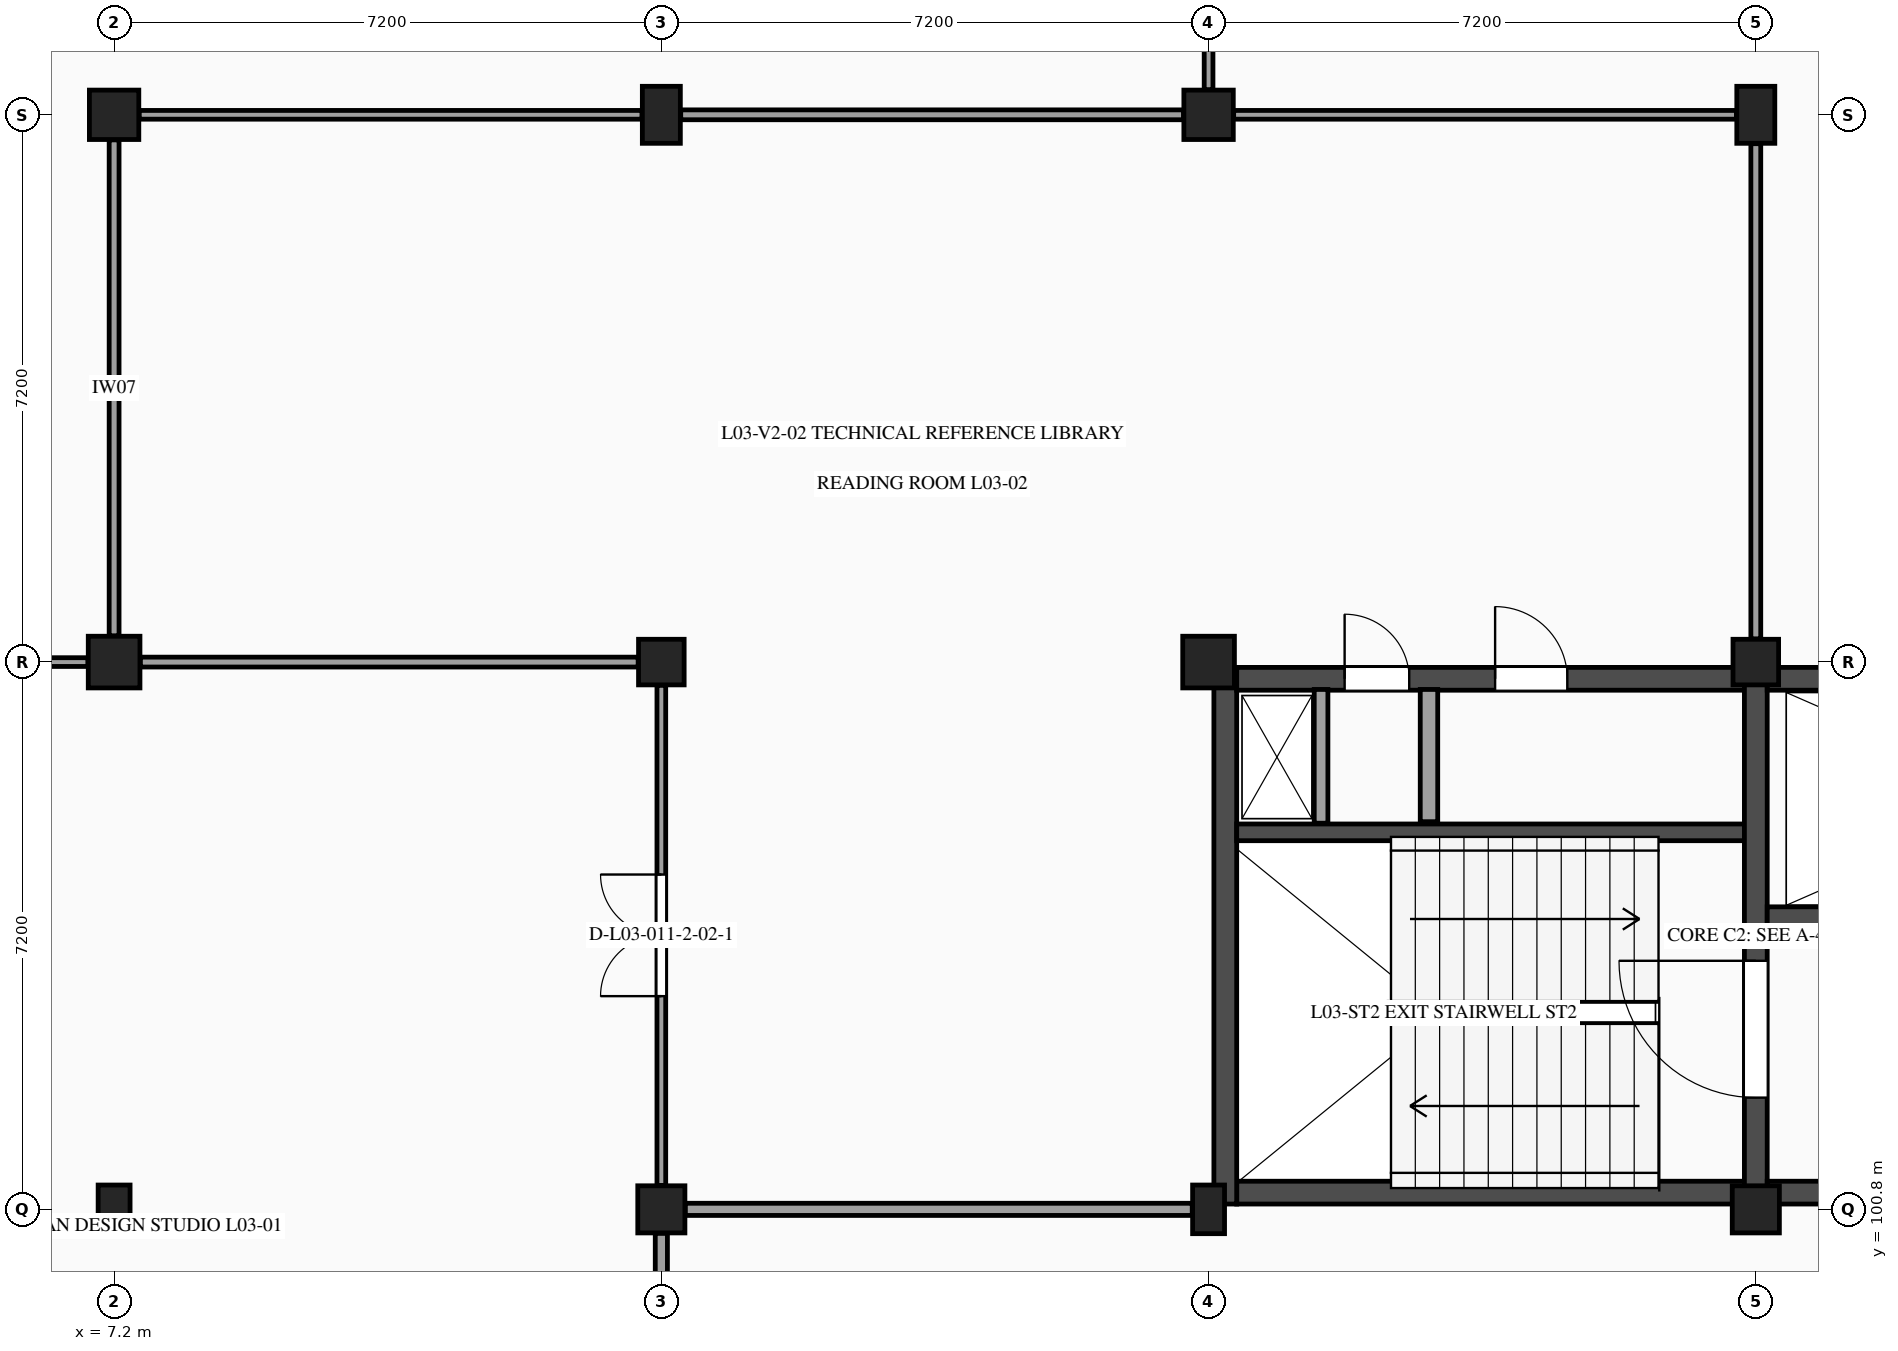
"""IFC4 building model, lengths in metres.
Left out: names, types, materials, properties, quantities, classifications, styles, units other than length and angle.
Written with IfcOpenShell. Run it as: python <this file> out.ifc"""

import sys

from ifc_helpers import new_model, si_unit, direction, frame, frame_2d, origin, origin_2d, place, context, subcontext, project, spatial, rectangle, extrude, element, fill, save


model = new_model("IFC4")
c1 = context("Model", 3, precision=1e-05, world=origin(), true_north=direction((0.0, 1.0)))
c2 = subcontext(c1, "Body", "Model", "MODEL_VIEW")
j1 = project(units=[si_unit("LENGTHUNIT", "METRE"), si_unit("PLANEANGLEUNIT", "RADIAN")], contexts=[c1])
p1 = place(None, origin())
s1 = spatial("IfcSite", under=j1, at=p1, CompositionType="ELEMENT")
p2 = place(p1, origin())
s2 = spatial("IfcBuilding", under=s1, at=p2, CompositionType="ELEMENT")
p3 = place(p2, frame((0.0, 0.0, 14.4)))
s3 = spatial("IfcBuildingStorey", under=s2, at=p3, CompositionType="ELEMENT", Elevation=14.4)
p4 = place(p3, frame((7.2, 100.8, 0.0), z_axis=(0.0, 0.0, 1.0), x_axis=(1.0, 0.0, 0.0)))
e1 = element("IfcColumn", 1, at=p4, inside=s3, PredefinedType="PILASTER", context=c2, shape_type="SweptSolid", body=[
    extrude(rectangle(XDim=0.42, YDim=0.64, at=origin_2d()), origin(), (0.0, 0.0, 1.0), 4.2),
])
p5 = place(p3, frame((7.2, 108.0, 0.0), z_axis=(0.0, 0.0, 1.0), x_axis=(1.0, 0.0, 0.0)))
e2 = element("IfcColumn", 2, at=p5, inside=s3, PredefinedType="COLUMN", context=c2, shape_type="SweptSolid", body=[
    extrude(rectangle(XDim=0.68, YDim=0.68, at=origin_2d()), origin(), (0.0, 0.0, 1.0), 4.2),
])
p6 = place(p3, frame((7.2, 115.2, 0.0), z_axis=(0.0, 0.0, 1.0), x_axis=(1.0, 0.0, 0.0)))
e3 = element("IfcColumn", 3, at=p6, inside=s3, PredefinedType="COLUMN", context=c2, shape_type="SweptSolid", body=[
    extrude(rectangle(XDim=0.65, YDim=0.65, at=origin_2d()), origin(), (0.0, 0.0, 1.0), 4.2),
])
p7 = place(p3, frame((14.4, 100.8, 0.0), z_axis=(0.0, 0.0, 1.0), x_axis=(1.0, 0.0, 0.0)))
e4 = element("IfcColumn", 4, at=p7, inside=s3, PredefinedType="COLUMN", context=c2, shape_type="SweptSolid", body=[
    extrude(rectangle(XDim=0.62, YDim=0.62, at=origin_2d()), origin(), (0.0, 0.0, 1.0), 4.2),
])
p8 = place(p3, frame((14.4, 108.0, 0.0), z_axis=(0.0, 0.0, 1.0), x_axis=(1.0, 0.0, 0.0)))
e5 = element("IfcColumn", 5, at=p8, inside=s3, PredefinedType="COLUMN", context=c2, shape_type="SweptSolid", body=[
    extrude(rectangle(XDim=0.6, YDim=0.6, at=origin_2d()), origin(), (0.0, 0.0, 1.0), 4.2),
])
p9 = place(p3, frame((14.4, 115.2, 0.0), z_axis=(0.0, 0.0, 1.0), x_axis=(1.0, 0.0, 0.0)))
e6 = element("IfcColumn", 6, at=p9, inside=s3, PredefinedType="COLUMN", context=c2, shape_type="SweptSolid", body=[
    extrude(rectangle(XDim=0.5, YDim=0.75, at=origin_2d()), origin(), (0.0, 0.0, 1.0), 4.2),
])
p10 = place(p3, frame((21.6, 100.8, 0.0), z_axis=(0.0, 0.0, 1.0), x_axis=(1.0, 0.0, 0.0)))
e7 = element("IfcColumn", 7, at=p10, inside=s3, PredefinedType="PILASTER", context=c2, shape_type="SweptSolid", body=[
    extrude(rectangle(XDim=0.42, YDim=0.64, at=origin_2d()), origin(), (0.0, 0.0, 1.0), 4.2),
])
p11 = place(p3, frame((21.6, 108.0, 0.0), z_axis=(0.0, 0.0, 1.0), x_axis=(1.0, 0.0, 0.0)))
e8 = element("IfcColumn", 8, at=p11, inside=s3, PredefinedType="COLUMN", context=c2, shape_type="SweptSolid", body=[
    extrude(rectangle(XDim=0.68, YDim=0.68, at=origin_2d()), origin(), (0.0, 0.0, 1.0), 4.2),
])
p12 = place(p3, frame((21.6, 115.2, 0.0), z_axis=(0.0, 0.0, 1.0), x_axis=(1.0, 0.0, 0.0)))
e9 = element("IfcColumn", 9, at=p12, inside=s3, PredefinedType="COLUMN", context=c2, shape_type="SweptSolid", body=[
    extrude(rectangle(XDim=0.65, YDim=0.65, at=origin_2d()), origin(), (0.0, 0.0, 1.0), 4.2),
])
p13 = place(p3, frame((28.8, 100.8, 0.0), z_axis=(0.0, 0.0, 1.0), x_axis=(1.0, 0.0, 0.0)))
e10 = element("IfcColumn", 10, at=p13, inside=s3, PredefinedType="COLUMN", context=c2, shape_type="SweptSolid", body=[
    extrude(rectangle(XDim=0.62, YDim=0.62, at=origin_2d()), origin(), (0.0, 0.0, 1.0), 4.2),
])
p14 = place(p3, frame((28.8, 108.0, 0.0), z_axis=(0.0, 0.0, 1.0), x_axis=(1.0, 0.0, 0.0)))
e11 = element("IfcColumn", 11, at=p14, inside=s3, PredefinedType="COLUMN", context=c2, shape_type="SweptSolid", body=[
    extrude(rectangle(XDim=0.6, YDim=0.6, at=origin_2d()), origin(), (0.0, 0.0, 1.0), 4.2),
])
p15 = place(p3, frame((28.8, 115.2, 0.0), z_axis=(0.0, 0.0, 1.0), x_axis=(1.0, 0.0, 0.0)))
e12 = element("IfcColumn", 12, at=p15, inside=s3, PredefinedType="COLUMN", context=c2, shape_type="SweptSolid", body=[
    extrude(rectangle(XDim=0.5, YDim=0.75, at=origin_2d()), origin(), (0.0, 0.0, 1.0), 4.2),
])
p16 = place(p3, frame((21.97, 101.02, 0.0), z_axis=(0.0, 0.0, 1.0), x_axis=(1.0, 0.0, 0.0)))
e13 = element("IfcWall", 13, at=p16, inside=s3, PredefinedType="SHEAR", context=c2, shape_type="SweptSolid", body=[
    extrude(rectangle(XDim=6.68, YDim=0.3, at=frame_2d((3.34, 0.0))), origin(), (0.0, 0.0, 1.0), 3.94),
])
p17 = place(p3, frame((21.82, 107.93, 0.0), z_axis=(0.0, 0.0, 1.0), x_axis=(0.0, -1.0, 0.0)))
e14 = element("IfcWall", 14, at=p17, inside=s3, PredefinedType="SHEAR", context=c2, shape_type="SweptSolid", body=[
    extrude(rectangle(XDim=7.06, YDim=0.3, at=frame_2d((3.53, 0.0))), origin(), (0.0, 0.0, 1.0), 3.94),
])
p18 = place(p3, frame((21.97, 107.78, 0.0), z_axis=(0.0, 0.0, 1.0), x_axis=(1.0, 0.0, 0.0)))
e15 = element("IfcWall", 15, at=p18, inside=s3, PredefinedType="SHEAR", context=c2, shape_type="SweptSolid", body=[
    extrude(rectangle(XDim=6.68, YDim=0.3, at=frame_2d((3.34, 0.0))), origin(), (0.0, 0.0, 1.0), 3.94),
])
p19 = place(p18, frame((1.42, 0.0, 0.0)))
e16 = element("IfcOpeningElement", 16, at=p19, cuts=e15, PredefinedType="OPENING", context=c2, shape_type="SweptSolid", body=[
    extrude(rectangle(XDim=0.85, YDim=2.1, at=frame_2d((0.425, 1.05))), frame((0.0, 0.16, 0.0), z_axis=(0.0, -1.0, 0.0), x_axis=(1.0, 0.0, 0.0)), (0.0, 0.0, 1.0), 0.32),
])
p20 = place(p18, frame((3.4, 0.0, 0.0)))
e17 = element("IfcOpeningElement", 17, at=p20, cuts=e15, PredefinedType="OPENING", context=c2, shape_type="SweptSolid", body=[
    extrude(rectangle(XDim=0.95, YDim=2.15, at=frame_2d((0.475, 1.075))), frame((0.0, 0.16, 0.0), z_axis=(0.0, -1.0, 0.0), x_axis=(1.0, 0.0, 0.0)), (0.0, 0.0, 1.0), 0.32),
])
p21 = place(p3, frame((21.97, 105.76, 0.0), z_axis=(0.0, 0.0, 1.0), x_axis=(1.0, 0.0, 0.0)))
e18 = element("IfcWall", 18, at=p21, inside=s3, PredefinedType="SHEAR", context=c2, shape_type="SweptSolid", body=[
    extrude(rectangle(XDim=6.68, YDim=0.22, at=frame_2d((3.34, 0.0))), origin(), (0.0, 0.0, 1.0), 3.94),
])
p22 = place(p3, frame((24.5, 105.9, 0.0), z_axis=(0.0, 0.0, 1.0), x_axis=(0.0, 1.0, 0.0)))
e19 = element("IfcWall", 19, at=p22, inside=s3, PredefinedType="PARTITIONING", context=c2, shape_type="SweptSolid", body=[
    extrude(rectangle(XDim=1.74, YDim=0.23, at=frame_2d((0.87, 0.0))), origin(), (0.0, 0.0, 1.0), 3.94),
])
p23 = place(p3, frame((23.08, 105.88, 0.0), z_axis=(0.0, 0.0, 1.0), x_axis=(0.0, 1.0, 0.0)))
e20 = element("IfcWall", 20, at=p23, inside=s3, PredefinedType="PARTITIONING", context=c2, shape_type="SweptSolid", body=[
    extrude(rectangle(XDim=1.76, YDim=0.18, at=frame_2d((0.88, 0.0))), origin(), (0.0, 0.0, 1.0), 3.94),
])
p24 = place(p3, frame((28.8, 100.87, 0.0), z_axis=(0.0, 0.0, 1.0), x_axis=(0.0, 1.0, 0.0)))
e21 = element("IfcWall", 21, at=p24, inside=s3, PredefinedType="SHEAR", context=c2, shape_type="SweptSolid", body=[
    extrude(rectangle(XDim=7.06, YDim=0.3, at=frame_2d((3.53, 0.0))), origin(), (0.0, 0.0, 1.0), 3.94),
])
p25 = place(p24, frame((1.4, 0.0, 0.0)))
e22 = element("IfcOpeningElement", 22, at=p25, cuts=e21, PredefinedType="OPENING", context=c2, shape_type="SweptSolid", body=[
    extrude(rectangle(XDim=1.8, YDim=2.2, at=frame_2d((0.9, 1.1))), frame((0.0, 0.16, 0.0), z_axis=(0.0, -1.0, 0.0), x_axis=(1.0, 0.0, 0.0)), (0.0, 0.0, 1.0), 0.32),
])
p26 = place(p3, frame((28.95, 101.02, 0.0), z_axis=(0.0, 0.0, 1.0), x_axis=(1.0, 0.0, 0.0)))
e23 = element("IfcWall", 23, at=p26, inside=s3, PredefinedType="SHEAR", context=c2, shape_type="SweptSolid", body=[
    extrude(rectangle(XDim=6.68, YDim=0.3, at=frame_2d((3.34, 0.0))), origin(), (0.0, 0.0, 1.0), 3.94),
])
p27 = place(p26, frame((2.22, 0.0, 0.0)))
e24 = element("IfcOpeningElement", 24, at=p27, cuts=e23, PredefinedType="OPENING", context=c2, shape_type="SweptSolid", body=[
    extrude(rectangle(XDim=1.8, YDim=2.2, at=frame_2d((0.9, 1.1))), frame((0.0, 0.16, 0.0), z_axis=(0.0, -1.0, 0.0), x_axis=(1.0, 0.0, 0.0)), (0.0, 0.0, 1.0), 0.32),
])
p28 = place(p3, frame((28.95, 107.78, 0.0), z_axis=(0.0, 0.0, 1.0), x_axis=(1.0, 0.0, 0.0)))
e25 = element("IfcWall", 25, at=p28, inside=s3, PredefinedType="SHEAR", context=c2, shape_type="SweptSolid", body=[
    extrude(rectangle(XDim=6.68, YDim=0.3, at=frame_2d((3.34, 0.0))), origin(), (0.0, 0.0, 1.0), 3.94),
])
p29 = place(p3, frame((28.95, 104.65, 0.0), z_axis=(0.0, 0.0, 1.0), x_axis=(1.0, 0.0, 0.0)))
e26 = element("IfcWall", 26, at=p29, inside=s3, PredefinedType="SHEAR", context=c2, shape_type="SweptSolid", body=[
    extrude(rectangle(XDim=6.68, YDim=0.26, at=frame_2d((3.34, 0.0))), origin(), (0.0, 0.0, 1.0), 3.94),
])
p30 = place(p29, frame((0.95, 0.0, 0.0)))
e27 = element("IfcOpeningElement", 27, at=p30, cuts=e26, PredefinedType="OPENING", context=c2, shape_type="SweptSolid", body=[
    extrude(rectangle(XDim=1.1, YDim=2.2, at=frame_2d((0.55, 1.1))), frame((0.0, 0.14, 0.0), z_axis=(0.0, -1.0, 0.0), x_axis=(1.0, 0.0, 0.0)), (0.0, 0.0, 1.0), 0.28),
])
p31 = place(p29, frame((4.1, 0.0, 0.0)))
e28 = element("IfcOpeningElement", 28, at=p31, cuts=e26, PredefinedType="OPENING", context=c2, shape_type="SweptSolid", body=[
    extrude(rectangle(XDim=1.0, YDim=2.15, at=frame_2d((0.5, 1.075))), frame((0.0, 0.14, 0.0), z_axis=(0.0, -1.0, 0.0), x_axis=(1.0, 0.0, 0.0)), (0.0, 0.0, 1.0), 0.28),
])
p32 = place(p3, frame((0.305, 108.0, 0.0), z_axis=(0.0, 0.0, 1.0), x_axis=(1.0, 0.0, 0.0)))
e29 = element("IfcWall", 29, at=p32, inside=s3, PredefinedType="PARTITIONING", context=c2, shape_type="SweptSolid", body=[
    extrude(rectangle(XDim=6.55, YDim=0.115, at=frame_2d((3.275, 0.0))), origin(), (0.0, 0.0, 1.0), 3.215),
])
p33 = place(p32, frame((2.315, 0.0, 0.0)))
e30 = element("IfcOpeningElement", 30, at=p33, cuts=e29, PredefinedType="OPENING", context=c2, shape_type="SweptSolid", body=[
    extrude(rectangle(XDim=1.92, YDim=2.35, at=frame_2d((0.96, 1.175))), frame((0.0, 0.067, 0.0), z_axis=(0.0, -1.0, 0.0), x_axis=(1.0, 0.0, 0.0)), (0.0, 0.0, 1.0), 0.135),
])
p34 = place(p3, frame((7.2, 108.345, 0.0), z_axis=(0.0, 0.0, 1.0), x_axis=(0.0, 1.0, 0.0)))
e31 = element("IfcWall", 31, at=p34, inside=s3, PredefinedType="PARTITIONING", context=c2, shape_type="SweptSolid", body=[
    extrude(rectangle(XDim=6.525, YDim=0.13, at=frame_2d((3.263, 0.0))), origin(), (0.0, 0.0, 1.0), 3.245),
])
p35 = place(p3, frame((14.4, 93.93, 0.0), z_axis=(0.0, 0.0, 1.0), x_axis=(0.0, 1.0, 0.0)))
e32 = element("IfcWall", 32, at=p35, inside=s3, PredefinedType="PARTITIONING", context=c2, shape_type="SweptSolid", body=[
    extrude(rectangle(XDim=6.555, YDim=0.16, at=frame_2d((3.278, 0.0))), origin(), (0.0, 0.0, 1.0), 3.255),
])
p36 = place(p35, frame((2.587, 0.0, 0.0)))
e33 = element("IfcOpeningElement", 33, at=p36, cuts=e32, PredefinedType="OPENING", context=c2, shape_type="SweptSolid", body=[
    extrude(rectangle(XDim=1.38, YDim=2.22, at=frame_2d((0.69, 1.11))), frame((0.0, 0.09, 0.0), z_axis=(0.0, -1.0, 0.0), x_axis=(1.0, 0.0, 0.0)), (0.0, 0.0, 1.0), 0.18),
])
p37 = place(p3, frame((14.4, 101.115, 0.0), z_axis=(0.0, 0.0, 1.0), x_axis=(0.0, 1.0, 0.0)))
e34 = element("IfcWall", 34, at=p37, inside=s3, PredefinedType="PARTITIONING", context=c2, shape_type="SweptSolid", body=[
    extrude(rectangle(XDim=6.58, YDim=0.115, at=frame_2d((3.29, 0.0))), origin(), (0.0, 0.0, 1.0), 3.25),
])
p38 = place(p37, frame((2.49, 0.0, 0.0)))
e35 = element("IfcOpeningElement", 35, at=p38, cuts=e34, PredefinedType="OPENING", context=c2, shape_type="SweptSolid", body=[
    extrude(rectangle(XDim=1.6, YDim=2.2, at=frame_2d((0.8, 1.1))), frame((0.0, 0.067, 0.0), z_axis=(0.0, -1.0, 0.0), x_axis=(1.0, 0.0, 0.0)), (0.0, 0.0, 1.0), 0.135),
])
p39 = place(p3, frame((7.545, 108.0, 0.0), z_axis=(0.0, 0.0, 1.0), x_axis=(1.0, 0.0, 0.0)))
e36 = element("IfcWall", 36, at=p39, inside=s3, PredefinedType="PARTITIONING", context=c2, shape_type="SweptSolid", body=[
    extrude(rectangle(XDim=6.55, YDim=0.13, at=frame_2d((3.275, 0.0))), origin(), (0.0, 0.0, 1.0), 3.22),
])
p40 = place(p3, frame((7.53, 115.2, 0.0), z_axis=(0.0, 0.0, 1.0), x_axis=(1.0, 0.0, 0.0)))
e37 = element("IfcWall", 37, at=p40, inside=s3, PredefinedType="PARTITIONING", context=c2, shape_type="SweptSolid", body=[
    extrude(rectangle(XDim=6.615, YDim=0.115, at=frame_2d((3.308, 0.0))), origin(), (0.0, 0.0, 1.0), 3.22),
])
p41 = place(p3, frame((14.715, 100.8, 0.0), z_axis=(0.0, 0.0, 1.0), x_axis=(1.0, 0.0, 0.0)))
e38 = element("IfcWall", 38, at=p41, inside=s3, PredefinedType="PARTITIONING", context=c2, shape_type="SweptSolid", body=[
    extrude(rectangle(XDim=6.67, YDim=0.16, at=frame_2d((3.335, 0.0))), origin(), (0.0, 0.0, 1.0), 3.24),
])
p42 = place(p3, frame((14.655, 115.2, 0.0), z_axis=(0.0, 0.0, 1.0), x_axis=(1.0, 0.0, 0.0)))
e39 = element("IfcWall", 39, at=p42, inside=s3, PredefinedType="PARTITIONING", context=c2, shape_type="SweptSolid", body=[
    extrude(rectangle(XDim=6.615, YDim=0.13, at=frame_2d((3.308, 0.0))), origin(), (0.0, 0.0, 1.0), 3.24),
])
p43 = place(p3, frame((21.6, 115.53, 0.0), z_axis=(0.0, 0.0, 1.0), x_axis=(0.0, 1.0, 0.0)))
e40 = element("IfcWall", 40, at=p43, inside=s3, PredefinedType="PARTITIONING", context=c2, shape_type="SweptSolid", body=[
    extrude(rectangle(XDim=6.555, YDim=0.115, at=frame_2d((3.277, 0.0))), origin(), (0.0, 0.0, 1.0), 3.245),
])
p44 = place(p43, frame((2.397, 0.0, 0.0)))
e41 = element("IfcOpeningElement", 41, at=p44, cuts=e40, PredefinedType="OPENING", context=c2, shape_type="SweptSolid", body=[
    extrude(rectangle(XDim=1.76, YDim=2.3, at=frame_2d((0.88, 1.15))), frame((0.0, 0.067, 0.0), z_axis=(0.0, -1.0, 0.0), x_axis=(1.0, 0.0, 0.0)), (0.0, 0.0, 1.0), 0.135),
])
p45 = place(p3, frame((28.8, 108.305, 0.0), z_axis=(0.0, 0.0, 1.0), x_axis=(0.0, 1.0, 0.0)))
e42 = element("IfcWall", 42, at=p45, inside=s3, PredefinedType="PARTITIONING", context=c2, shape_type="SweptSolid", body=[
    extrude(rectangle(XDim=6.515, YDim=0.13, at=frame_2d((3.258, 0.0))), origin(), (0.0, 0.0, 1.0), 3.245),
])
p46 = place(p3, frame((21.93, 115.2, 0.0), z_axis=(0.0, 0.0, 1.0), x_axis=(1.0, 0.0, 0.0)))
e43 = element("IfcWall", 43, at=p46, inside=s3, PredefinedType="PARTITIONING", context=c2, shape_type="SweptSolid", body=[
    extrude(rectangle(XDim=6.615, YDim=0.115, at=frame_2d((3.308, 0.0))), origin(), (0.0, 0.0, 1.0), 3.28),
])
p47 = place(p19, origin())
e44 = element("IfcDoor", 44, at=p47, inside=s3, OperationType="SINGLE_SWING_LEFT", PredefinedType="DOOR", context=c2, shape_type="SweptSolid", body=[
    extrude(rectangle(XDim=0.85, YDim=2.1, at=frame_2d((0.425, 1.05))), frame((0.0, 0.025, 0.0), z_axis=(0.0, -1.0, 0.0), x_axis=(1.0, 0.0, 0.0)), (0.0, 0.0, 1.0), 0.05),
])
fill(e16, e44)
p48 = place(p25, origin())
e45 = element("IfcDoor", 45, at=p48, inside=s3, OperationType="SINGLE_SWING_RIGHT", PredefinedType="DOOR", context=c2, shape_type="SweptSolid", body=[
    extrude(rectangle(XDim=1.8, YDim=2.2, at=frame_2d((0.9, 1.1))), frame((0.0, 0.025, 0.0), z_axis=(0.0, -1.0, 0.0), x_axis=(1.0, 0.0, 0.0)), (0.0, 0.0, 1.0), 0.05),
])
fill(e22, e45)
p49 = place(p20, origin())
e46 = element("IfcDoor", 46, at=p49, inside=s3, OperationType="SINGLE_SWING_LEFT", PredefinedType="DOOR", context=c2, shape_type="SweptSolid", body=[
    extrude(rectangle(XDim=0.95, YDim=2.15, at=frame_2d((0.475, 1.075))), frame((0.0, 0.025, 0.0), z_axis=(0.0, -1.0, 0.0), x_axis=(1.0, 0.0, 0.0)), (0.0, 0.0, 1.0), 0.05),
])
fill(e17, e46)
p50 = place(p38, origin())
e47 = element("IfcDoor", 47, at=p50, inside=s3, OperationType="DOUBLE_DOOR_SINGLE_SWING", PredefinedType="DOOR", context=c2, shape_type="SweptSolid", body=[
    extrude(rectangle(XDim=1.6, YDim=2.2, at=frame_2d((0.8, 1.1))), frame((0.0, 0.025, 0.0), z_axis=(0.0, -1.0, 0.0), x_axis=(1.0, 0.0, 0.0)), (0.0, 0.0, 1.0), 0.05),
])
fill(e35, e47)
save(model, sys.argv[1])
